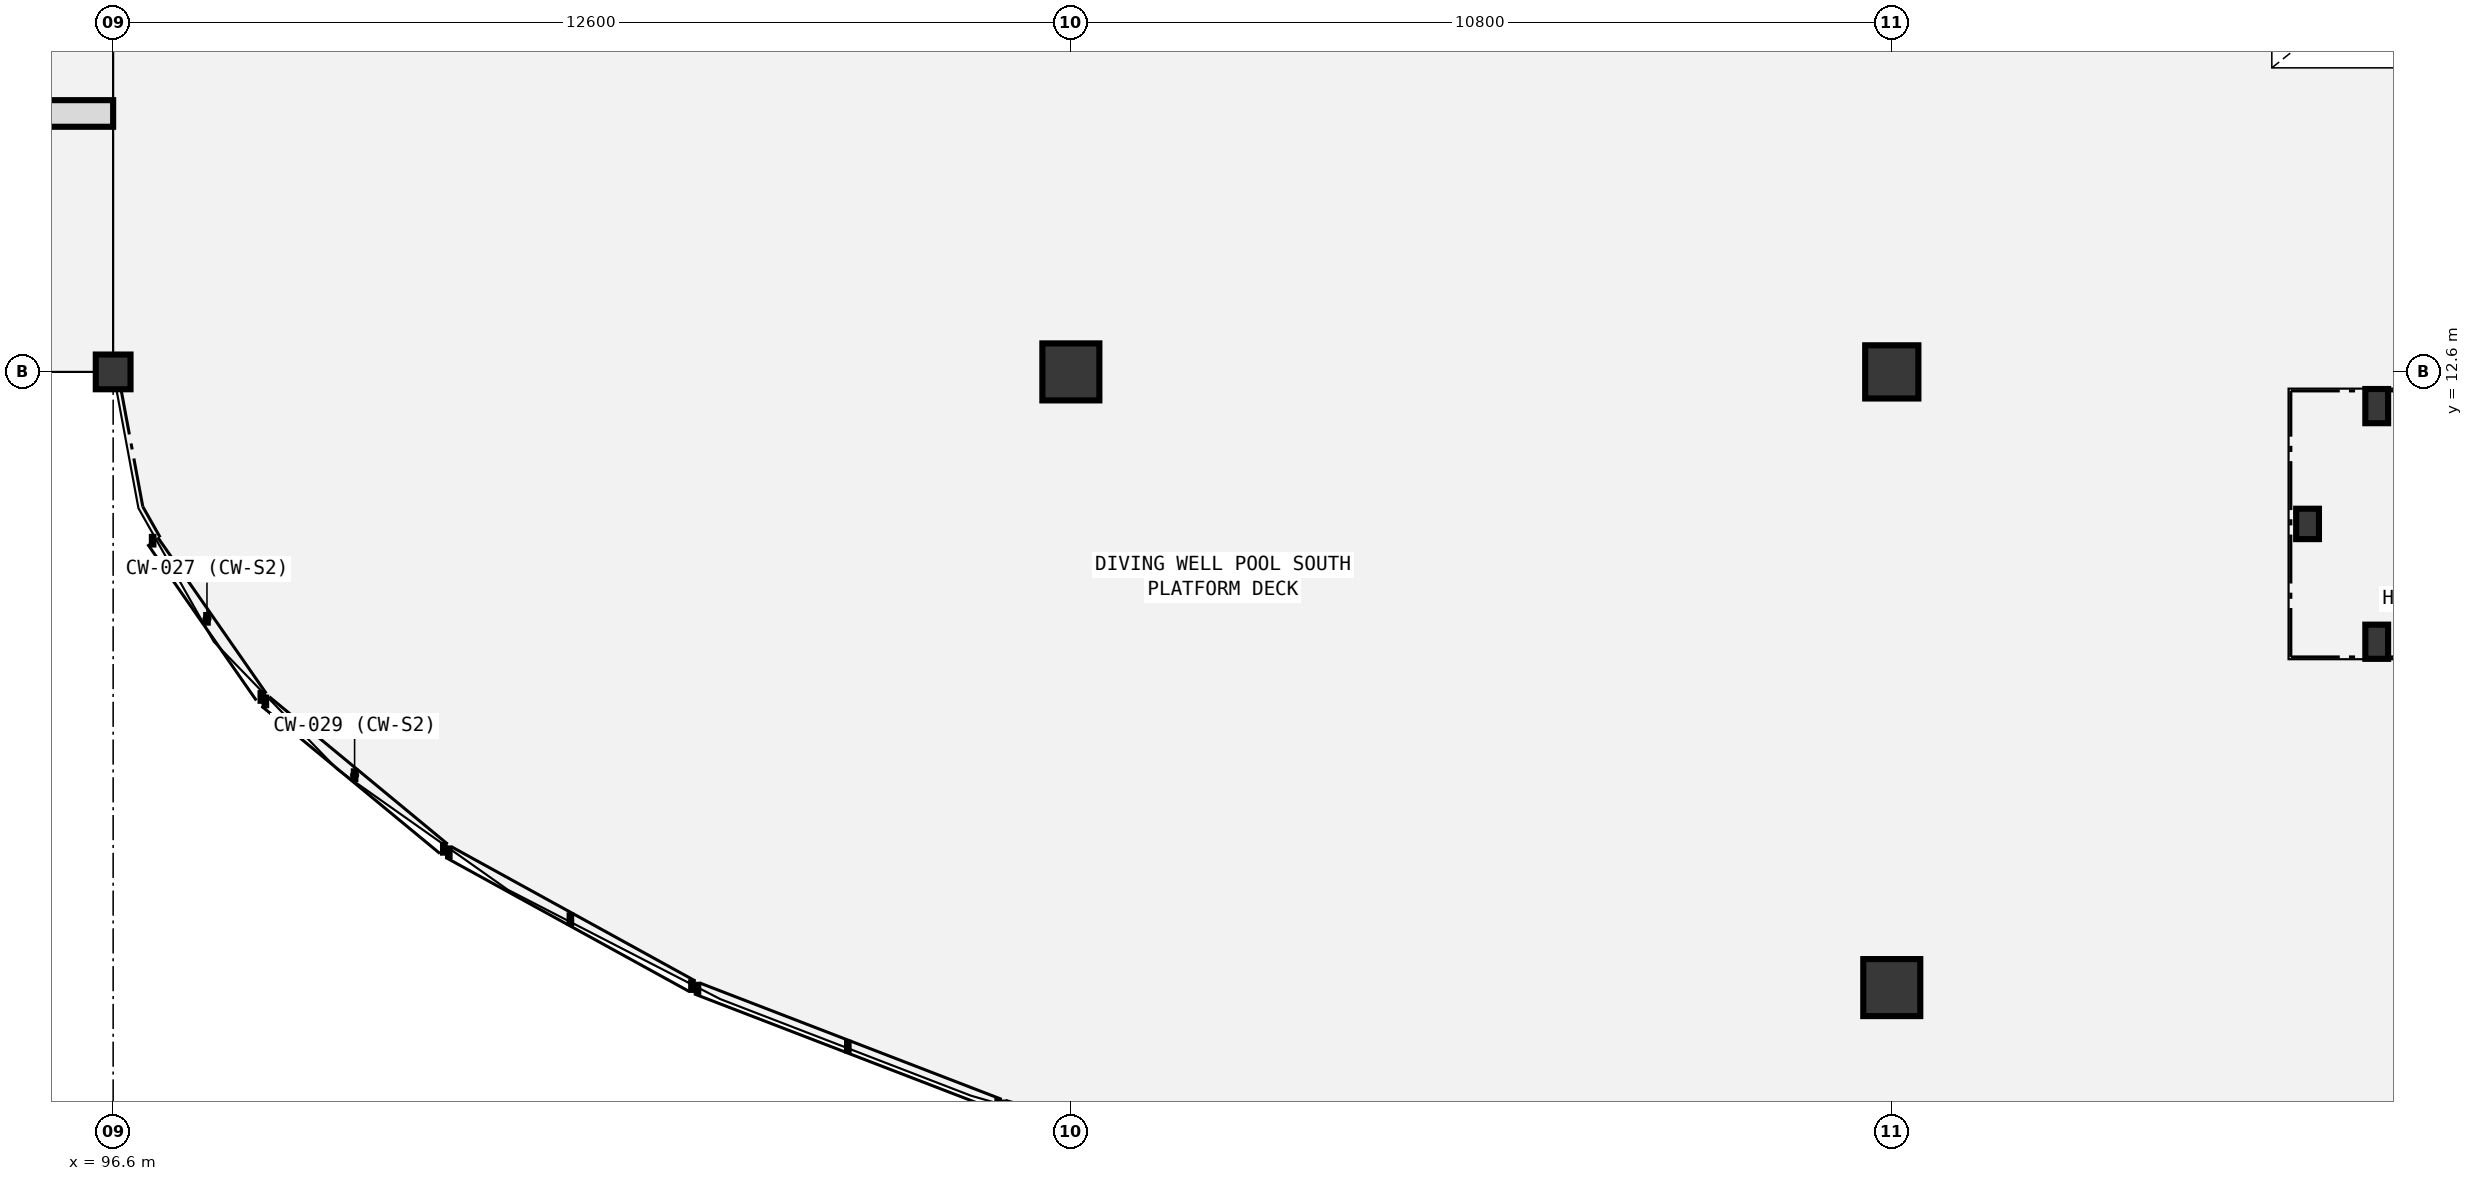
"""IFC4 building model, lengths in metres.
Left out: names, types, materials, properties, quantities, classifications, styles, units other than length and angle.
Written with IfcOpenShell. Run it as: python <this file> out.ifc"""

import sys

from ifc_helpers import new_model, si_unit, direction, frame, frame_2d, origin, origin_2d, place, context, subcontext, project, spatial, rectangle, hollow_circle, i_section, extrude, element, save


model = new_model("IFC4")
c1 = context("Model", 3, precision=1e-05, world=origin(), true_north=direction((0.0, 1.0)))
c2 = subcontext(c1, "Body", "Model", "MODEL_VIEW")
j1 = project(units=[si_unit("LENGTHUNIT", "METRE"), si_unit("PLANEANGLEUNIT", "RADIAN")], contexts=[c1])
p1 = place(None, origin())
s1 = spatial("IfcSite", under=j1, at=p1, CompositionType="ELEMENT")
p2 = place(p1, origin())
s2 = spatial("IfcBuilding", under=s1, at=p2, CompositionType="ELEMENT")
p3 = place(p2, origin())
s3 = spatial("IfcBuildingStorey", under=s2, at=p3, CompositionType="ELEMENT", Elevation=0.0)
p4 = place(p3, frame((96.6, 12.6, 0.0), z_axis=(0.0, 0.0, 1.0), x_axis=(1.0, 0.0, 0.0)))
e1 = element("IfcColumn", 1, at=p4, inside=s3, PredefinedType="COLUMN", context=c2, shape_type="SweptSolid", body=[
    extrude(hollow_circle(Radius=0.229, WallThickness=0.016, at=origin_2d()), origin(), (0.0, 0.0, 1.0), 5.4),
])
for number, where, z_axis, x_axis in (
    (2, (109.2, 12.6, 0.0), (0.0, 0.0, 1.0), (1.0, 0.0, 0.0)),
    (3, (120.0, 4.5, 0.0), (0.0, 0.0, 1.0), (1.0, 0.0, 0.0)),
):
    element("IfcColumn", number, at=place(p3, frame(where, z_axis=z_axis, x_axis=x_axis)), inside=s3, PredefinedType="COLUMN", context=c2, shape_type="SweptSolid", body=[
        extrude(rectangle(XDim=0.75, YDim=0.75, at=origin_2d()), origin(), (0.0, 0.0, 1.0), 5.4),
    ])
p5 = place(p3, frame((120.0, 12.6, 0.0), z_axis=(0.0, 0.0, 1.0), x_axis=(1.0, 0.0, 0.0)))
e4 = element("IfcColumn", 4, at=p5, inside=s3, PredefinedType="COLUMN", context=c2, shape_type="SweptSolid", body=[
    extrude(rectangle(XDim=0.7, YDim=0.7, at=origin_2d()), origin(), (0.0, 0.0, 1.0), 5.4),
])
p6 = place(p3, frame((84.6, 16.0, 0.0), z_axis=(0.0, 0.0, 1.0), x_axis=(1.0, 0.0, 0.0)))
e5 = element("IfcWall", 5, at=p6, inside=s3, PredefinedType="SOLIDWALL", context=c2, shape_type="SweptSolid", body=[
    extrude(rectangle(XDim=12.0, YDim=0.35, at=frame_2d((6.0, 0.0))), origin(), (0.0, 0.0, 1.0), 5.8),
])
p7 = place(p6, frame((3.2, 0.0, 0.0)))
e6 = element("IfcOpeningElement", 6, at=p7, cuts=e5, PredefinedType="OPENING", context=c2, shape_type="SweptSolid", body=[
    extrude(rectangle(XDim=2.4, YDim=2.5, at=frame_2d((1.2, 1.25))), frame((0.0, 0.185, 0.0), z_axis=(0.0, -1.0, 0.0), x_axis=(1.0, 0.0, 0.0)), (0.0, 0.0, 1.0), 0.37),
])
p8 = place(p6, frame((7.0, 0.0, 0.9)))
e7 = element("IfcOpeningElement", 7, at=p8, cuts=e5, PredefinedType="OPENING", context=c2, shape_type="SweptSolid", body=[
    extrude(rectangle(XDim=3.2, YDim=1.5, at=frame_2d((1.6, 0.75))), frame((0.0, 0.185, 0.0), z_axis=(0.0, -1.0, 0.0), x_axis=(1.0, 0.0, 0.0)), (0.0, 0.0, 1.0), 0.37),
])
for number, where, z_axis, x_axis in (
    (8, (126.38, 9.05, 0.0), (0.0, 0.0, 1.0), (1.0, 0.0, 0.0)),
    (9, (126.38, 12.15, 0.0), (0.0, 0.0, 1.0), (1.0, 0.0, 0.0)),
):
    element("IfcColumn", number, at=place(p3, frame(where, z_axis=z_axis, x_axis=x_axis)), inside=s3, PredefinedType="COLUMN", context=c2, shape_type="SweptSolid", body=[
        extrude(i_section(OverallWidth=0.3, OverallDepth=0.45, WebThickness=0.014, FlangeThickness=0.026, FilletRadius=0.027, at=origin_2d()), origin(), (0.0, 0.0, 1.0), 2.46),
    ])
p9 = place(p3, frame((125.47, 10.6, 0.0), z_axis=(0.0, 0.0, 1.0), x_axis=(1.0, 0.0, 0.0)))
e10 = element("IfcColumn", 10, at=p9, inside=s3, PredefinedType="COLUMN", context=c2, shape_type="SweptSolid", body=[
    extrude(i_section(OverallWidth=0.3, OverallDepth=0.4, WebThickness=0.013, FlangeThickness=0.024, FilletRadius=0.027, at=origin_2d()), origin(), (0.0, 0.0, 1.0), 2.46),
])
save(model, sys.argv[1])
